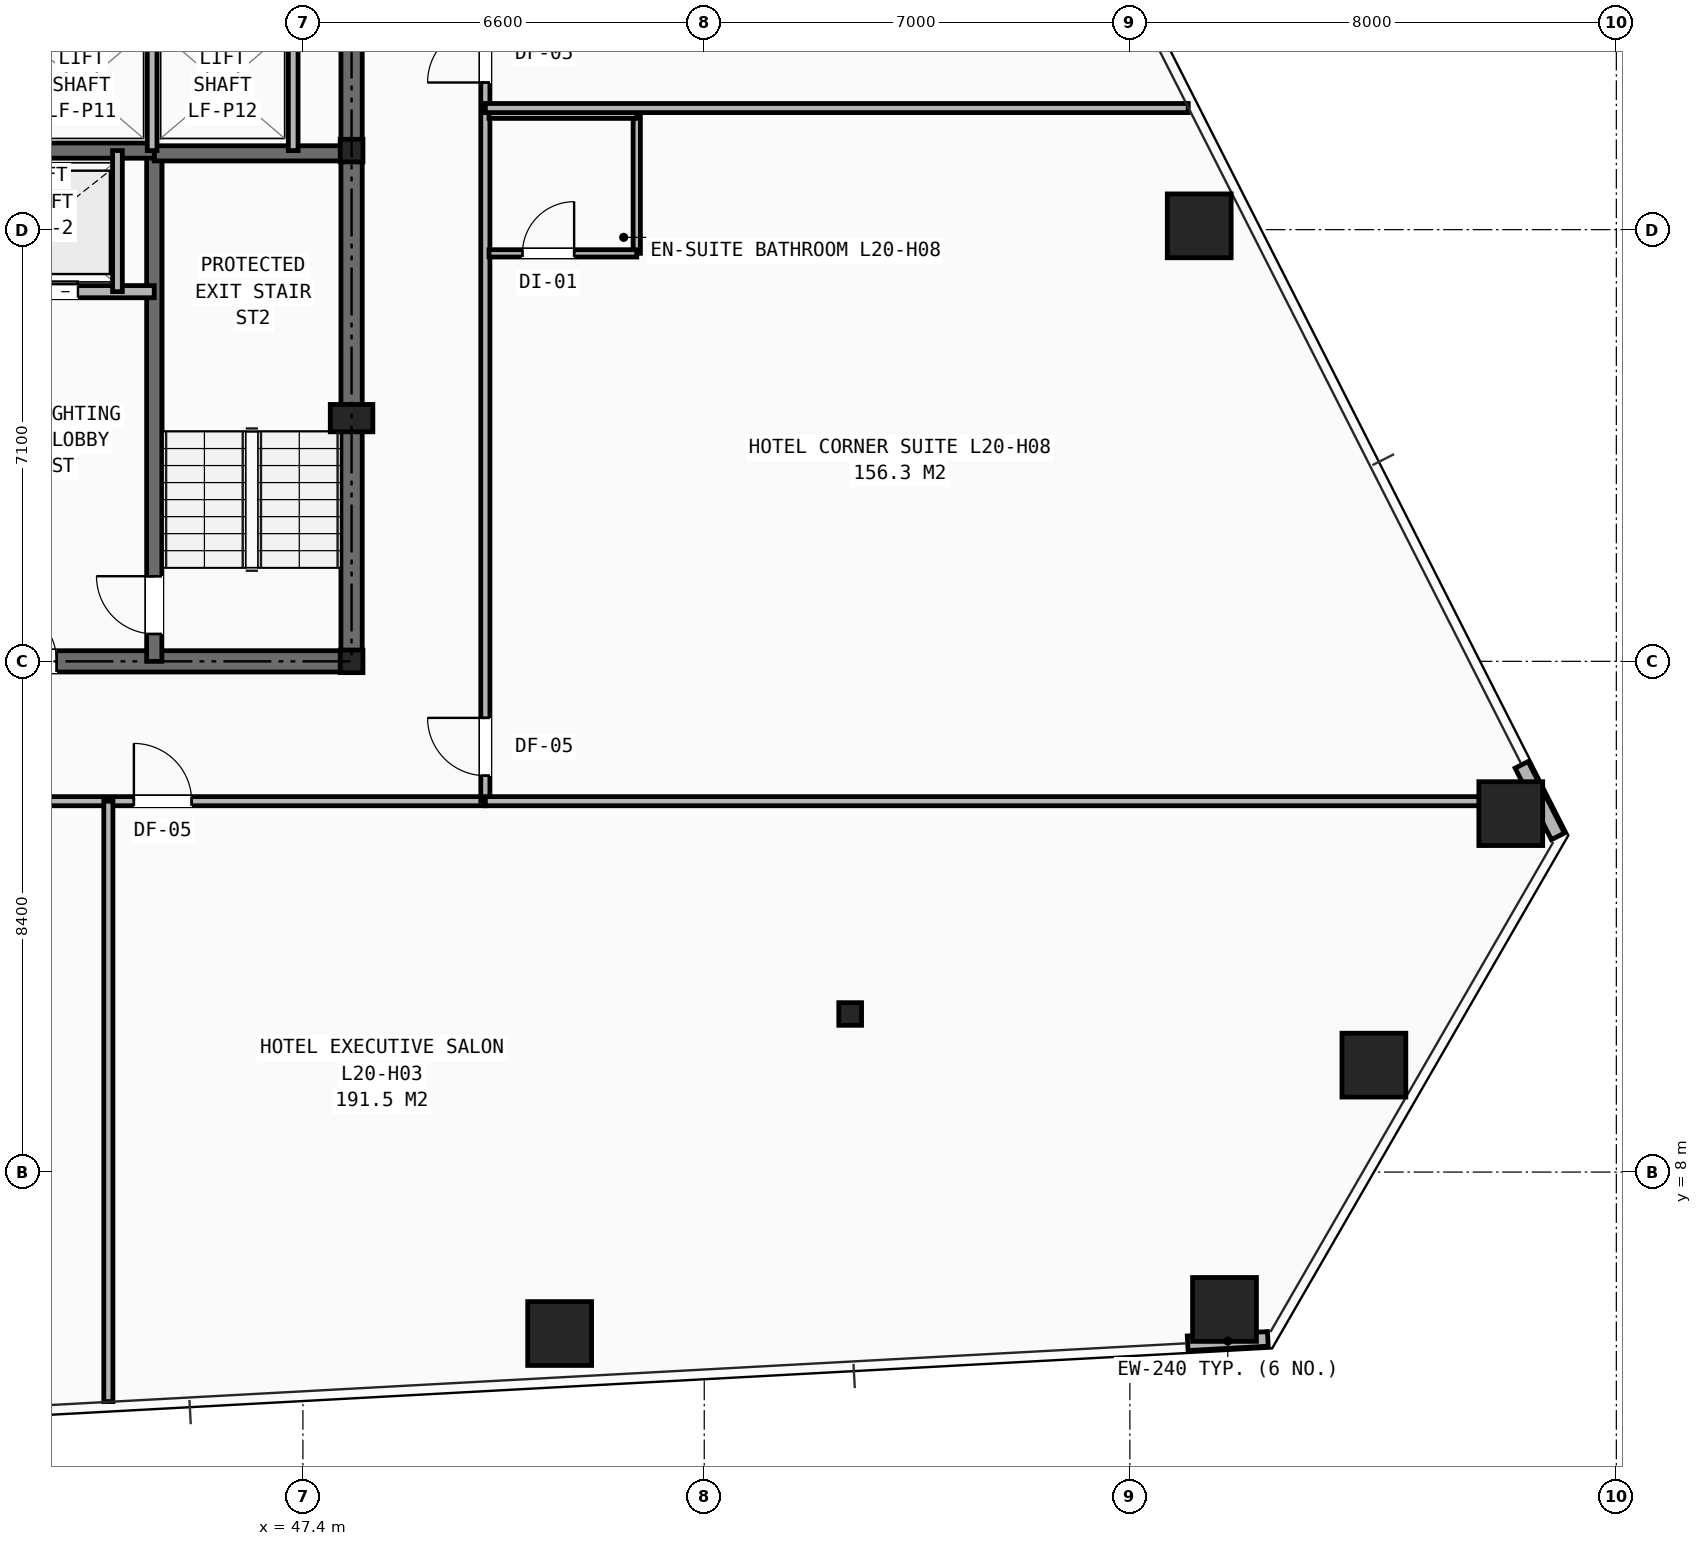
"""IFC4 building model, lengths in metres.
Left out: names, types, materials, properties, quantities, classifications, styles, units other than length and angle.
Written with IfcOpenShell. Run it as: python <this file> out.ifc"""

import sys

from ifc_helpers import new_model, si_unit, direction, frame, frame_2d, origin, origin_2d, place, context, subcontext, project, spatial, rectangle, hollow_rectangle, i_section, extrude, element, fill, save


model = new_model("IFC4")
c1 = context("Model", 3, precision=1e-05, world=origin(), true_north=direction((0.0, 1.0)))
c2 = subcontext(c1, "Body", "Model", "MODEL_VIEW")
j1 = project(units=[si_unit("LENGTHUNIT", "METRE"), si_unit("PLANEANGLEUNIT", "RADIAN")], contexts=[c1])
p1 = place(None, origin())
s1 = spatial("IfcSite", under=j1, at=p1, CompositionType="ELEMENT")
p2 = place(p1, origin())
s2 = spatial("IfcBuilding", under=s1, at=p2, CompositionType="ELEMENT")
p3 = place(p2, frame((0.0, 0.0, 73.4)))
s3 = spatial("IfcBuildingStorey", under=s2, at=p3, CompositionType="ELEMENT", Elevation=73.4)
for number, where, z_axis, x_axis in (
    (1, (48.2, 16.4, 0.0), (0.0, 0.0, 1.0), (1.0, 0.0, 0.0)),
    (2, (48.2, 24.8, 0.0), (0.0, 0.0, 1.0), (1.0, 0.0, 0.0)),
    (3, (56.4, 10.6, 0.0), (0.0, 0.0, 1.0), (1.0, 0.0, 0.0)),
):
    element("IfcColumn", number, at=place(p3, frame(where, z_axis=z_axis, x_axis=x_axis)), inside=s3, PredefinedType="COLUMN", context=c2, shape_type="SweptSolid", body=[
        extrude(i_section(OverallWidth=0.374, OverallDepth=0.372, WebThickness=0.016, FlangeThickness=0.026, at=origin_2d()), origin(), (0.0, 0.0, 1.0), 3.2),
    ])
p4 = place(p3, frame((48.2, 20.4, 0.0), z_axis=(0.0, 0.0, 1.0), x_axis=(1.0, 0.0, 0.0)))
e4 = element("IfcColumn", 4, at=p4, inside=s3, PredefinedType="PILASTER", context=c2, shape_type="SweptSolid", body=[
    extrude(rectangle(XDim=0.7, YDim=0.45, at=origin_2d()), origin(), (0.0, 0.0, 1.0), 3.2),
])
for number, where, z_axis, x_axis in (
    (5, (51.622, 5.344, 0.0), (0.0, 0.0, 1.0), (1.0, 0.0, 0.0)),
    (6, (62.556, 5.741, 0.0), (0.0, 0.0, 1.0), (1.0, 0.0, 0.0)),
    (7, (65.013, 9.759, 0.0), (0.0, 0.0, 1.0), (1.0, 0.0, 0.0)),
    (8, (67.264, 13.896, 0.0), (0.0, 0.0, 1.0), (1.0, 0.0, 0.0)),
    (9, (62.14, 23.563, 0.0), (0.0, 0.0, 1.0), (1.0, 0.0, 0.0)),
):
    element("IfcColumn", number, at=place(p3, frame(where, z_axis=z_axis, x_axis=x_axis)), inside=s3, PredefinedType="COLUMN", context=c2, shape_type="SweptSolid", body=[
        extrude(hollow_rectangle(XDim=1.05, YDim=1.05, WallThickness=0.07, at=origin_2d()), origin(), (0.0, 0.0, 1.0), 3.2),
    ])
p5 = place(p3, frame((61.95, 5.185, 0.0), z_axis=(0.0, 0.0, 1.0), x_axis=(0.998531751411, 0.054169561778, 0.0)))
e10 = element("IfcWall", 10, at=p5, inside=s3, PredefinedType="SHEAR", context=c2, shape_type="SweptSolid", body=[
    extrude(rectangle(XDim=1.321, YDim=0.24, at=frame_2d((0.66, 0.0))), origin(), (0.0, 0.0, 1.0), 2.253),
])
p6 = place(p3, frame((68.04, 13.521, 0.0), z_axis=(0.0, 0.0, 1.0), x_axis=(-0.452239623624, 0.891896475396, 0.0)))
e11 = element("IfcWall", 11, at=p6, inside=s3, PredefinedType="SHEAR", context=c2, shape_type="SweptSolid", body=[
    extrude(rectangle(XDim=1.319, YDim=0.24, at=frame_2d((0.66, 0.0))), origin(), (0.0, 0.0, 1.0), 2.253),
])
p7 = place(p3, frame((31.8, 16.4, 0.0), z_axis=(0.0, 0.0, 1.0), x_axis=(1.0, 0.0, 0.0)))
e12 = element("IfcWall", 12, at=p7, inside=s3, PredefinedType="SHEAR", context=c2, shape_type="SweptSolid", body=[
    extrude(rectangle(XDim=16.4, YDim=0.35, at=frame_2d((8.2, 0.0))), origin(), (0.0, 0.0, 1.0), 2.97),
])
p8 = place(p7, frame((7.75, 0.0, 0.0)))
e13 = element("IfcOpeningElement", 13, at=p8, cuts=e12, PredefinedType="OPENING", context=c2, shape_type="SweptSolid", body=[
    extrude(rectangle(XDim=0.9, YDim=2.1, at=frame_2d((0.45, 1.05))), frame((0.0, 0.185, 0.0), z_axis=(0.0, -1.0, 0.0), x_axis=(1.0, 0.0, 0.0)), (0.0, 0.0, 1.0), 0.37),
])
p9 = place(p7, frame((4.2, 0.0, 0.0)))
e14 = element("IfcOpeningElement", 14, at=p9, cuts=e12, PredefinedType="OPENING", context=c2, shape_type="SweptSolid", body=[
    extrude(rectangle(XDim=0.95, YDim=2.1, at=frame_2d((0.475, 1.05))), frame((0.0, 0.185, 0.0), z_axis=(0.0, -1.0, 0.0), x_axis=(1.0, 0.0, 0.0)), (0.0, 0.0, 1.0), 0.37),
])
p10 = place(p7, frame((10.6, 0.0, 0.0)))
e15 = element("IfcOpeningElement", 15, at=p10, cuts=e12, PredefinedType="OPENING", context=c2, shape_type="SweptSolid", body=[
    extrude(rectangle(XDim=0.95, YDim=2.1, at=frame_2d((0.475, 1.05))), frame((0.0, 0.185, 0.0), z_axis=(0.0, -1.0, 0.0), x_axis=(1.0, 0.0, 0.0)), (0.0, 0.0, 1.0), 0.37),
])
p11 = place(p3, frame((48.2, 16.4, 0.0), z_axis=(0.0, 0.0, 1.0), x_axis=(0.0, 1.0, 0.0)))
e16 = element("IfcWall", 16, at=p11, inside=s3, PredefinedType="SHEAR", context=c2, shape_type="SweptSolid", body=[
    extrude(rectangle(XDim=14.8, YDim=0.35, at=frame_2d((7.4, 0.0))), origin(), (0.0, 0.0, 1.0), 2.97),
])
p12 = place(p11, frame((11.0, 0.0, 0.0)))
e17 = element("IfcOpeningElement", 17, at=p12, cuts=e16, PredefinedType="OPENING", context=c2, shape_type="SweptSolid", body=[
    extrude(rectangle(XDim=1.1, YDim=2.15, at=frame_2d((0.55, 1.075))), frame((0.0, 0.185, 0.0), z_axis=(0.0, -1.0, 0.0), x_axis=(1.0, 0.0, 0.0)), (0.0, 0.0, 1.0), 0.37),
])
p13 = place(p3, frame((44.955, 16.4, 0.0), z_axis=(0.0, 0.0, 1.0), x_axis=(0.0, 1.0, 0.0)))
e18 = element("IfcWall", 18, at=p13, inside=s3, PredefinedType="SHEAR", context=c2, shape_type="SweptSolid", body=[
    extrude(rectangle(XDim=8.4, YDim=0.25, at=frame_2d((4.2, 0.0))), origin(), (0.0, 0.0, 1.0), 2.97),
])
p14 = place(p13, frame((0.45, 0.0, 0.0)))
e19 = element("IfcOpeningElement", 19, at=p14, cuts=e18, PredefinedType="OPENING", context=c2, shape_type="SweptSolid", body=[
    extrude(rectangle(XDim=0.95, YDim=2.1, at=frame_2d((0.475, 1.05))), frame((0.0, 0.135, 0.0), z_axis=(0.0, -1.0, 0.0), x_axis=(1.0, 0.0, 0.0)), (0.0, 0.0, 1.0), 0.27),
])
p15 = place(p3, frame((44.955, 24.755, 0.0), z_axis=(0.0, 0.0, 1.0), x_axis=(1.0, 0.0, 0.0)))
e20 = element("IfcWall", 20, at=p15, inside=s3, PredefinedType="SHEAR", context=c2, shape_type="SweptSolid", body=[
    extrude(rectangle(XDim=3.245, YDim=0.25, at=frame_2d((1.623, 0.0))), origin(), (0.0, 0.0, 1.0), 2.97),
])
p16 = place(p3, frame((35.045, 24.8, 0.0), z_axis=(0.0, 0.0, 1.0), x_axis=(1.0, 0.0, 0.0)))
e21 = element("IfcWall", 21, at=p16, inside=s3, PredefinedType="SHEAR", context=c2, shape_type="SweptSolid", body=[
    extrude(rectangle(XDim=9.91, YDim=0.25, at=frame_2d((4.955, 0.0))), origin(), (0.0, 0.0, 1.0), 2.97),
])
p17 = place(p3, frame((35.045, 22.48, 0.0), z_axis=(0.0, 0.0, 1.0), x_axis=(1.0, 0.0, 0.0)))
e22 = element("IfcWall", 22, at=p17, inside=s3, PredefinedType="SOLIDWALL", context=c2, shape_type="SweptSolid", body=[
    extrude(rectangle(XDim=9.91, YDim=0.2, at=frame_2d((4.955, 0.0))), origin(), (0.0, 0.0, 1.0), 2.97),
])
p18 = place(p17, frame((1.255, 0.0, 0.0)))
e23 = element("IfcOpeningElement", 23, at=p18, cuts=e22, PredefinedType="OPENING", context=c2, shape_type="SweptSolid", body=[
    extrude(rectangle(XDim=1.1, YDim=2.15, at=frame_2d((0.55, 1.075))), frame((0.0, 0.11, 0.0), z_axis=(0.0, -1.0, 0.0), x_axis=(1.0, 0.0, 0.0)), (0.0, 0.0, 1.0), 0.22),
])
p19 = place(p17, frame((7.555, 0.0, 0.0)))
e24 = element("IfcOpeningElement", 24, at=p19, cuts=e22, PredefinedType="OPENING", context=c2, shape_type="SweptSolid", body=[
    extrude(rectangle(XDim=1.1, YDim=2.15, at=frame_2d((0.55, 1.075))), frame((0.0, 0.11, 0.0), z_axis=(0.0, -1.0, 0.0), x_axis=(1.0, 0.0, 0.0)), (0.0, 0.0, 1.0), 0.22),
])
p20 = place(p17, frame((4.405, 0.0, 0.0)))
e25 = element("IfcOpeningElement", 25, at=p20, cuts=e22, PredefinedType="OPENING", context=c2, shape_type="SweptSolid", body=[
    extrude(rectangle(XDim=1.1, YDim=2.15, at=frame_2d((0.55, 1.075))), frame((0.0, 0.11, 0.0), z_axis=(0.0, -1.0, 0.0), x_axis=(1.0, 0.0, 0.0)), (0.0, 0.0, 1.0), 0.22),
])
p21 = place(p3, frame((44.35, 22.48, 0.0), z_axis=(0.0, 0.0, 1.0), x_axis=(0.0, 1.0, 0.0)))
e26 = element("IfcWall", 26, at=p21, inside=s3, PredefinedType="SOLIDWALL", context=c2, shape_type="SweptSolid", body=[
    extrude(rectangle(XDim=2.32, YDim=0.16, at=frame_2d((1.16, 0.0))), origin(), (0.0, 0.0, 1.0), 2.97),
])
for number, where, z_axis, x_axis in (
    (27, (44.92, 24.8, 0.0), (0.0, 0.0, 1.0), (0.0, 1.0, 0.0)),
    (28, (47.24, 24.8, 0.0), (0.0, 0.0, 1.0), (0.0, 1.0, 0.0)),
):
    element("IfcWall", number, at=place(p3, frame(where, z_axis=z_axis, x_axis=x_axis)), inside=s3, PredefinedType="SOLIDWALL", context=c2, shape_type="SweptSolid", body=[
        extrude(rectangle(XDim=2.08, YDim=0.16, at=frame_2d((1.04, 0.0))), origin(), (0.0, 0.0, 1.0), 2.97),
    ])
p22 = place(p3, frame((29.6, 14.1, 0.0), z_axis=(0.0, 0.0, 1.0), x_axis=(1.0, 0.0, 0.0)))
e29 = element("IfcWall", 29, at=p22, inside=s3, PredefinedType="PARTITIONING", context=c2, shape_type="SweptSolid", body=[
    extrude(rectangle(XDim=20.8, YDim=0.15, at=frame_2d((10.4, 0.0))), origin(), (0.0, 0.0, 1.0), 2.421),
])
p23 = place(p22, frame((0.57, 0.0, 0.0)))
e30 = element("IfcOpeningElement", 30, at=p23, cuts=e29, PredefinedType="OPENING", context=c2, shape_type="SweptSolid", body=[
    extrude(rectangle(XDim=0.95, YDim=2.1, at=frame_2d((0.475, 1.05))), frame((0.0, 0.085, 0.0), z_axis=(0.0, -1.0, 0.0), x_axis=(1.0, 0.0, 0.0)), (0.0, 0.0, 1.0), 0.17),
])
p24 = place(p22, frame((5.82, 0.0, 0.0)))
e31 = element("IfcOpeningElement", 31, at=p24, cuts=e29, PredefinedType="OPENING", context=c2, shape_type="SweptSolid", body=[
    extrude(rectangle(XDim=0.95, YDim=2.1, at=frame_2d((0.475, 1.05))), frame((0.0, 0.085, 0.0), z_axis=(0.0, -1.0, 0.0), x_axis=(1.0, 0.0, 0.0)), (0.0, 0.0, 1.0), 0.17),
])
p25 = place(p22, frame((15.02, 0.0, 0.0)))
e32 = element("IfcOpeningElement", 32, at=p25, cuts=e29, PredefinedType="OPENING", context=c2, shape_type="SweptSolid", body=[
    extrude(rectangle(XDim=0.95, YDim=2.1, at=frame_2d((0.475, 1.05))), frame((0.0, 0.085, 0.0), z_axis=(0.0, -1.0, 0.0), x_axis=(1.0, 0.0, 0.0)), (0.0, 0.0, 1.0), 0.17),
])
p26 = place(p3, frame((50.4, 14.1, 0.0), z_axis=(0.0, 0.0, 1.0), x_axis=(0.0, 1.0, 0.0)))
e33 = element("IfcWall", 33, at=p26, inside=s3, PredefinedType="PARTITIONING", context=c2, shape_type="SweptSolid", body=[
    extrude(rectangle(XDim=21.9, YDim=0.15, at=frame_2d((10.95, 0.0))), origin(), (0.0, 0.0, 1.0), 2.421),
])
p27 = place(p26, frame((0.42, 0.0, 0.0)))
e34 = element("IfcOpeningElement", 34, at=p27, cuts=e33, PredefinedType="OPENING", context=c2, shape_type="SweptSolid", body=[
    extrude(rectangle(XDim=0.95, YDim=2.1, at=frame_2d((0.475, 1.05))), frame((0.0, 0.085, 0.0), z_axis=(0.0, -1.0, 0.0), x_axis=(1.0, 0.0, 0.0)), (0.0, 0.0, 1.0), 0.17),
])
p28 = place(p26, frame((11.82, 0.0, 0.0)))
e35 = element("IfcOpeningElement", 35, at=p28, cuts=e33, PredefinedType="OPENING", context=c2, shape_type="SweptSolid", body=[
    extrude(rectangle(XDim=0.95, YDim=2.1, at=frame_2d((0.475, 1.05))), frame((0.0, 0.085, 0.0), z_axis=(0.0, -1.0, 0.0), x_axis=(1.0, 0.0, 0.0)), (0.0, 0.0, 1.0), 0.17),
])
p29 = place(p3, frame((44.2, 4.225, 0.0), z_axis=(0.0, 0.0, 1.0), x_axis=(0.0, 1.0, 0.0)))
e36 = element("IfcWall", 36, at=p29, inside=s3, PredefinedType="PARTITIONING", context=c2, shape_type="SweptSolid", body=[
    extrude(rectangle(XDim=9.875, YDim=0.15, at=frame_2d((4.938, 0.0))), origin(), (0.0, 0.0, 1.0), 2.258),
])
p30 = place(p3, frame((50.4, 14.1, 0.0), z_axis=(0.0, 0.0, 1.0), x_axis=(1.0, 0.0, 0.0)))
e37 = element("IfcWall", 37, at=p30, inside=s3, PredefinedType="PARTITIONING", context=c2, shape_type="SweptSolid", body=[
    extrude(rectangle(XDim=17.341, YDim=0.15, at=frame_2d((8.67, 0.0))), origin(), (0.0, 0.0, 1.0), 2.258),
])
p31 = place(p3, frame((52.89, 23.11, 0.0), z_axis=(0.0, 0.0, 1.0), x_axis=(0.0, 1.0, 0.0)))
e38 = element("IfcWall", 38, at=p31, inside=s3, PredefinedType="PARTITIONING", context=c2, shape_type="SweptSolid", body=[
    extrude(rectangle(XDim=2.28, YDim=0.12, at=frame_2d((1.14, 0.0))), origin(), (0.0, 0.0, 1.0), 2.97),
])
p32 = place(p3, frame((50.46, 23.11, 0.0), z_axis=(0.0, 0.0, 1.0), x_axis=(1.0, 0.0, 0.0)))
e39 = element("IfcWall", 39, at=p32, inside=s3, PredefinedType="PARTITIONING", context=c2, shape_type="SweptSolid", body=[
    extrude(rectangle(XDim=2.43, YDim=0.12, at=frame_2d((1.215, 0.0))), origin(), (0.0, 0.0, 1.0), 2.97),
])
p33 = place(p32, frame((0.55, 0.0, 0.0)))
e40 = element("IfcOpeningElement", 40, at=p33, cuts=e39, PredefinedType="OPENING", context=c2, shape_type="SweptSolid", body=[
    extrude(rectangle(XDim=0.85, YDim=2.05, at=frame_2d((0.425, 1.025))), frame((0.0, 0.07, 0.0), z_axis=(0.0, -1.0, 0.0), x_axis=(1.0, 0.0, 0.0)), (0.0, 0.0, 1.0), 0.14),
])
p34 = place(p3, frame((50.46, 25.39, 0.0), z_axis=(0.0, 0.0, 1.0), x_axis=(1.0, 0.0, 0.0)))
e41 = element("IfcWall", 41, at=p34, inside=s3, PredefinedType="PARTITIONING", context=c2, shape_type="SweptSolid", body=[
    extrude(rectangle(XDim=2.43, YDim=0.12, at=frame_2d((1.215, 0.0))), origin(), (0.0, 0.0, 1.0), 2.97),
])
p35 = place(p3, frame((50.4, 25.5, 0.0), z_axis=(0.0, 0.0, 1.0), x_axis=(1.0, 0.0, 0.0)))
e42 = element("IfcWall", 42, at=p35, inside=s3, PredefinedType="PARTITIONING", context=c2, shape_type="SweptSolid", body=[
    extrude(rectangle(XDim=11.56, YDim=0.15, at=frame_2d((5.78, 0.0))), origin(), (0.0, 0.0, 1.0), 2.258),
])
p36 = place(p14, origin())
e43 = element("IfcDoor", 43, at=p36, inside=s3, OperationType="SINGLE_SWING_RIGHT", PredefinedType="DOOR", context=c2, shape_type="SweptSolid", body=[
    extrude(rectangle(XDim=0.95, YDim=2.1, at=frame_2d((0.475, 1.05))), frame((0.0, 0.025, 0.0), z_axis=(0.0, -1.0, 0.0), x_axis=(1.0, 0.0, 0.0)), (0.0, 0.0, 1.0), 0.05),
])
fill(e19, e43)
p37 = place(p10, origin())
e44 = element("IfcDoor", 44, at=p37, inside=s3, OperationType="SINGLE_SWING_LEFT", PredefinedType="DOOR", context=c2, shape_type="SweptSolid", body=[
    extrude(rectangle(XDim=0.95, YDim=2.1, at=frame_2d((0.475, 1.05))), frame((0.0, 0.025, 0.0), z_axis=(0.0, -1.0, 0.0), x_axis=(1.0, 0.0, 0.0)), (0.0, 0.0, 1.0), 0.05),
])
fill(e15, e44)
p38 = place(p19, origin())
e45 = element("IfcDoor", 45, at=p38, inside=s3, OperationType="DOUBLE_DOOR_SLIDING", PredefinedType="DOOR", context=c2, shape_type="SweptSolid", body=[
    extrude(rectangle(XDim=1.1, YDim=2.15, at=frame_2d((0.55, 1.075))), frame((0.0, 0.025, 0.0), z_axis=(0.0, -1.0, 0.0), x_axis=(1.0, 0.0, 0.0)), (0.0, 0.0, 1.0), 0.05),
])
fill(e24, e45)
p39 = place(p25, origin())
e46 = element("IfcDoor", 46, at=p39, inside=s3, OperationType="SINGLE_SWING_LEFT", PredefinedType="DOOR", context=c2, shape_type="SweptSolid", body=[
    extrude(rectangle(XDim=0.95, YDim=2.1, at=frame_2d((0.475, 1.05))), frame((0.0, 0.025, 0.0), z_axis=(0.0, -1.0, 0.0), x_axis=(1.0, 0.0, 0.0)), (0.0, 0.0, 1.0), 0.05),
])
fill(e32, e46)
p40 = place(p27, origin())
e47 = element("IfcDoor", 47, at=p40, inside=s3, OperationType="SINGLE_SWING_RIGHT", PredefinedType="DOOR", context=c2, shape_type="SweptSolid", body=[
    extrude(rectangle(XDim=0.95, YDim=2.1, at=frame_2d((0.475, 1.05))), frame((0.0, 0.025, 0.0), z_axis=(0.0, -1.0, 0.0), x_axis=(1.0, 0.0, 0.0)), (0.0, 0.0, 1.0), 0.05),
])
fill(e34, e47)
p41 = place(p33, origin())
e48 = element("IfcDoor", 48, at=p41, inside=s3, OperationType="SINGLE_SWING_RIGHT", PredefinedType="DOOR", context=c2, shape_type="SweptSolid", body=[
    extrude(rectangle(XDim=0.85, YDim=2.05, at=frame_2d((0.425, 1.025))), frame((0.0, 0.025, 0.0), z_axis=(0.0, -1.0, 0.0), x_axis=(1.0, 0.0, 0.0)), (0.0, 0.0, 1.0), 0.05),
])
fill(e40, e48)
p42 = place(p28, origin())
e49 = element("IfcDoor", 49, at=p42, inside=s3, OperationType="SINGLE_SWING_LEFT", PredefinedType="DOOR", context=c2, shape_type="SweptSolid", body=[
    extrude(rectangle(XDim=0.95, YDim=2.1, at=frame_2d((0.475, 1.05))), frame((0.0, 0.025, 0.0), z_axis=(0.0, -1.0, 0.0), x_axis=(1.0, 0.0, 0.0)), (0.0, 0.0, 1.0), 0.05),
])
fill(e35, e49)
save(model, sys.argv[1])
